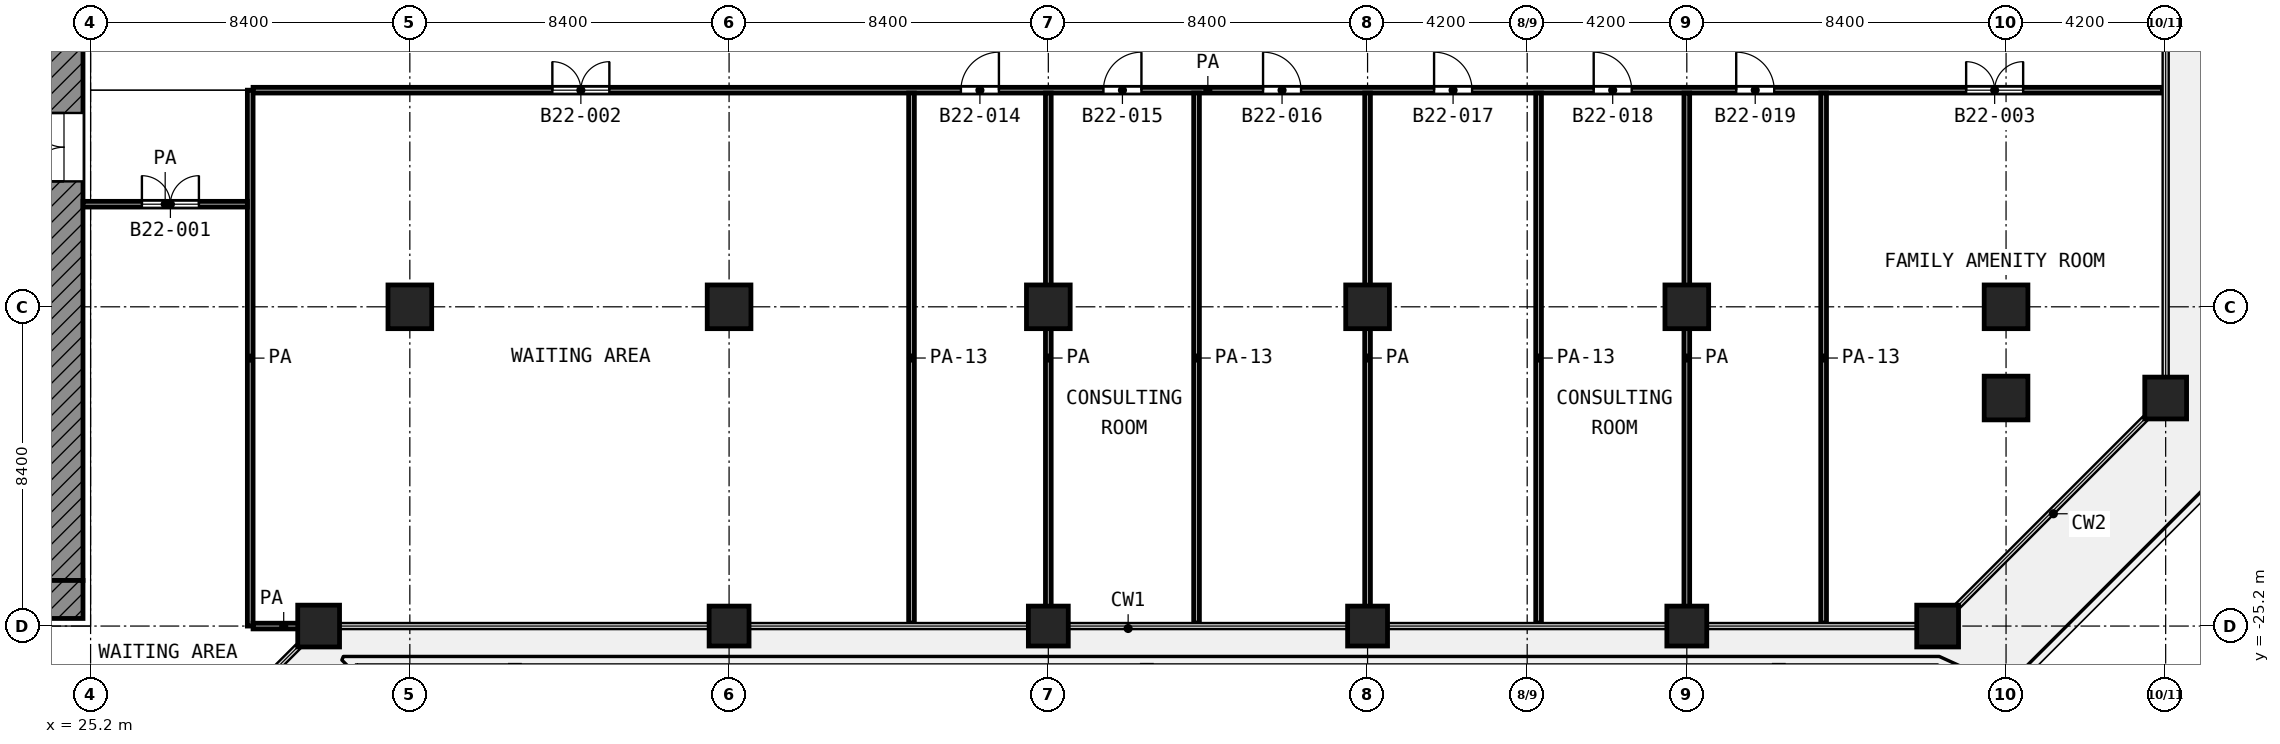
"""IFC4 building model, lengths in metres.
Left out: names, types, materials, properties, quantities, classifications, styles, units other than length and angle.
Written with IfcOpenShell. Run it as: python <this file> out.ifc"""

import sys

from ifc_helpers import new_model, si_unit, direction, frame, frame_2d, origin, origin_2d, place, context, subcontext, project, spatial, rectangle, extrude, element, fill, save


model = new_model("IFC4")
c1 = context("Model", 3, precision=1e-05, world=origin(), true_north=direction((0.0, 1.0)))
c2 = subcontext(c1, "Body", "Model", "MODEL_VIEW")
j1 = project(units=[si_unit("LENGTHUNIT", "METRE"), si_unit("PLANEANGLEUNIT", "RADIAN")], contexts=[c1])
p1 = place(None, origin())
s1 = spatial("IfcSite", under=j1, at=p1, CompositionType="ELEMENT")
p2 = place(p1, origin())
s2 = spatial("IfcBuilding", under=s1, at=p2, CompositionType="ELEMENT")
p3 = place(p2, frame((0.0, 0.0, 98.8)))
s3 = spatial("IfcBuildingStorey", under=s2, at=p3, CompositionType="ELEMENT", Elevation=98.8)
for number, where, z_axis, x_axis in (
    (1, (33.6, -16.8, 0.0), (0.0, 0.0, 1.0), (1.0, 0.0, 0.0)),
    (2, (42.0, -16.8, 0.0), (0.0, 0.0, 1.0), (1.0, 0.0, 0.0)),
    (3, (50.4, -16.8, 0.0), (0.0, 0.0, 1.0), (1.0, 0.0, 0.0)),
    (4, (58.8, -16.8, 0.0), (0.0, 0.0, 1.0), (1.0, 0.0, 0.0)),
    (5, (67.2, -16.8, 0.0), (0.0, 0.0, 1.0), (1.0, 0.0, 0.0)),
    (6, (75.6, -16.8, 0.0), (0.0, 0.0, 1.0), (1.0, 0.0, 0.0)),
    (7, (75.6, -19.2, 0.0), (0.0, 0.0, 1.0), (1.0, 0.0, 0.0)),
):
    element("IfcColumn", number, at=place(p3, frame(where, z_axis=z_axis, x_axis=x_axis)), inside=s3, PredefinedType="COLUMN", context=c2, shape_type="SweptSolid", body=[
        extrude(rectangle(XDim=1.15, YDim=1.15, at=origin_2d()), origin(), (0.0, 0.0, 1.0), 4.2),
    ])
for number, where, z_axis, x_axis in (
    (8, (79.8, -19.2, 0.0), (0.0, 0.0, 1.0), (1.0, 0.0, 0.0)),
    (9, (31.2, -25.2, 0.0), (0.0, 0.0, 1.0), (1.0, 0.0, 0.0)),
):
    element("IfcColumn", number, at=place(p3, frame(where, z_axis=z_axis, x_axis=x_axis)), inside=s3, PredefinedType="COLUMN", context=c2, shape_type="SweptSolid", body=[
        extrude(rectangle(XDim=1.1, YDim=1.1, at=origin_2d()), origin(), (0.0, 0.0, 1.0), 4.2),
    ])
for number, where, z_axis, x_axis in (
    (10, (42.0, -25.2, 0.0), (0.0, 0.0, 1.0), (1.0, 0.0, 0.0)),
    (11, (50.4, -25.2, 0.0), (0.0, 0.0, 1.0), (1.0, 0.0, 0.0)),
    (12, (58.8, -25.2, 0.0), (0.0, 0.0, 1.0), (1.0, 0.0, 0.0)),
    (13, (67.2, -25.2, 0.0), (0.0, 0.0, 1.0), (1.0, 0.0, 0.0)),
):
    element("IfcColumn", number, at=place(p3, frame(where, z_axis=z_axis, x_axis=x_axis)), inside=s3, PredefinedType="COLUMN", context=c2, shape_type="SweptSolid", body=[
        extrude(rectangle(XDim=1.05, YDim=1.05, at=origin_2d()), origin(), (0.0, 0.0, 1.0), 4.2),
    ])
p4 = place(p3, frame((73.8, -25.2, 0.0), z_axis=(0.0, 0.0, 1.0), x_axis=(1.0, 0.0, 0.0)))
e14 = element("IfcColumn", 14, at=p4, inside=s3, PredefinedType="COLUMN", context=c2, shape_type="SweptSolid", body=[
    extrude(rectangle(XDim=1.1, YDim=1.1, at=origin_2d()), origin(), (0.0, 0.0, 1.0), 4.2),
])
p5 = place(p3, frame((24.5, -24.0, 0.0), z_axis=(0.0, 0.0, 1.0), x_axis=(0.0, 1.0, 0.0)))
e15 = element("IfcWall", 15, at=p5, inside=s3, PredefinedType="SHEAR", context=c2, shape_type="SweptSolid", body=[
    extrude(rectangle(XDim=18.6, YDim=1.0, at=frame_2d((9.3, 0.0))), origin(), (0.0, 0.0, 1.0), 3.6),
])
p6 = place(p5, frame((10.5, 0.0, 0.0)))
e16 = element("IfcOpeningElement", 16, at=p6, cuts=e15, PredefinedType="OPENING", context=c2, shape_type="SweptSolid", body=[
    extrude(rectangle(XDim=1.8, YDim=2.1, at=frame_2d((0.9, 1.05))), frame((0.0, 0.51, 0.0), z_axis=(0.0, -1.0, 0.0), x_axis=(1.0, 0.0, 0.0)), (0.0, 0.0, 1.0), 1.02),
])
p7 = place(p3, frame((24.5, -25.0, 0.0), z_axis=(0.0, 0.0, 1.0), x_axis=(0.0, 1.0, 0.0)))
e17 = element("IfcWall", 17, at=p7, inside=s3, PredefinedType="SHEAR", context=c2, shape_type="SweptSolid", body=[
    extrude(rectangle(XDim=1.0, YDim=1.0, at=frame_2d((0.5, 0.0))), origin(), (0.0, 0.0, 1.0), 3.6),
])
p8 = place(p3, frame((29.475, -25.2, 0.0), z_axis=(0.0, 0.0, 1.0), x_axis=(1.0, 0.0, 0.0)))
e18 = element("IfcWall", 18, at=p8, inside=s3, PredefinedType="PARTITIONING", context=c2, shape_type="SweptSolid", body=[
    extrude(rectangle(XDim=1.612, YDim=0.15, at=frame_2d((0.806, 0.0))), origin(), (0.0, 0.0, 1.0), 3.6),
])
p9 = place(p3, frame((25.0, -14.1, 0.0), z_axis=(0.0, 0.0, 1.0), x_axis=(1.0, 0.0, 0.0)))
e19 = element("IfcWall", 19, at=p9, inside=s3, PredefinedType="PARTITIONING", context=c2, shape_type="SweptSolid", body=[
    extrude(rectangle(XDim=4.325, YDim=0.15, at=frame_2d((2.163, 0.0))), origin(), (0.0, 0.0, 1.0), 3.6),
])
p10 = place(p9, frame((1.55, 0.0, 0.0)))
e20 = element("IfcOpeningElement", 20, at=p10, cuts=e19, PredefinedType="OPENING", context=c2, shape_type="SweptSolid", body=[
    extrude(rectangle(XDim=1.5, YDim=2.1, at=frame_2d((0.75, 1.05))), frame((0.0, 0.085, 0.0), z_axis=(0.0, -1.0, 0.0), x_axis=(1.0, 0.0, 0.0)), (0.0, 0.0, 1.0), 0.17),
])
p11 = place(p3, frame((29.475, -11.1, 0.0), z_axis=(0.0, 0.0, 1.0), x_axis=(1.0, 0.0, 0.0)))
e21 = element("IfcWall", 21, at=p11, inside=s3, PredefinedType="PARTITIONING", context=c2, shape_type="SweptSolid", body=[
    extrude(rectangle(XDim=50.245, YDim=0.15, at=frame_2d((25.123, 0.0))), origin(), (0.0, 0.0, 1.0), 3.6),
])
p12 = place(p11, frame((7.875, 0.0, 0.0)))
e22 = element("IfcOpeningElement", 22, at=p12, cuts=e21, PredefinedType="OPENING", context=c2, shape_type="SweptSolid", body=[
    extrude(rectangle(XDim=1.5, YDim=2.1, at=frame_2d((0.75, 1.05))), frame((0.0, 0.085, 0.0), z_axis=(0.0, -1.0, 0.0), x_axis=(1.0, 0.0, 0.0)), (0.0, 0.0, 1.0), 0.17),
])
p13 = place(p11, frame((18.625, 0.0, 0.0)))
e23 = element("IfcOpeningElement", 23, at=p13, cuts=e21, PredefinedType="OPENING", context=c2, shape_type="SweptSolid", body=[
    extrude(rectangle(XDim=1.0, YDim=2.1, at=frame_2d((0.5, 1.05))), frame((0.0, 0.085, 0.0), z_axis=(0.0, -1.0, 0.0), x_axis=(1.0, 0.0, 0.0)), (0.0, 0.0, 1.0), 0.17),
])
p14 = place(p11, frame((22.375, 0.0, 0.0)))
e24 = element("IfcOpeningElement", 24, at=p14, cuts=e21, PredefinedType="OPENING", context=c2, shape_type="SweptSolid", body=[
    extrude(rectangle(XDim=1.0, YDim=2.1, at=frame_2d((0.5, 1.05))), frame((0.0, 0.085, 0.0), z_axis=(0.0, -1.0, 0.0), x_axis=(1.0, 0.0, 0.0)), (0.0, 0.0, 1.0), 0.17),
])
p15 = place(p11, frame((26.575, 0.0, 0.0)))
e25 = element("IfcOpeningElement", 25, at=p15, cuts=e21, PredefinedType="OPENING", context=c2, shape_type="SweptSolid", body=[
    extrude(rectangle(XDim=1.0, YDim=2.1, at=frame_2d((0.5, 1.05))), frame((0.0, 0.085, 0.0), z_axis=(0.0, -1.0, 0.0), x_axis=(1.0, 0.0, 0.0)), (0.0, 0.0, 1.0), 0.17),
])
p16 = place(p11, frame((31.075, 0.0, 0.0)))
e26 = element("IfcOpeningElement", 26, at=p16, cuts=e21, PredefinedType="OPENING", context=c2, shape_type="SweptSolid", body=[
    extrude(rectangle(XDim=1.0, YDim=2.1, at=frame_2d((0.5, 1.05))), frame((0.0, 0.085, 0.0), z_axis=(0.0, -1.0, 0.0), x_axis=(1.0, 0.0, 0.0)), (0.0, 0.0, 1.0), 0.17),
])
p17 = place(p11, frame((35.275, 0.0, 0.0)))
e27 = element("IfcOpeningElement", 27, at=p17, cuts=e21, PredefinedType="OPENING", context=c2, shape_type="SweptSolid", body=[
    extrude(rectangle(XDim=1.0, YDim=2.1, at=frame_2d((0.5, 1.05))), frame((0.0, 0.085, 0.0), z_axis=(0.0, -1.0, 0.0), x_axis=(1.0, 0.0, 0.0)), (0.0, 0.0, 1.0), 0.17),
])
p18 = place(p11, frame((39.025, 0.0, 0.0)))
e28 = element("IfcOpeningElement", 28, at=p18, cuts=e21, PredefinedType="OPENING", context=c2, shape_type="SweptSolid", body=[
    extrude(rectangle(XDim=1.0, YDim=2.1, at=frame_2d((0.5, 1.05))), frame((0.0, 0.085, 0.0), z_axis=(0.0, -1.0, 0.0), x_axis=(1.0, 0.0, 0.0)), (0.0, 0.0, 1.0), 0.17),
])
p19 = place(p11, frame((45.075, 0.0, 0.0)))
e29 = element("IfcOpeningElement", 29, at=p19, cuts=e21, PredefinedType="OPENING", context=c2, shape_type="SweptSolid", body=[
    extrude(rectangle(XDim=1.5, YDim=2.1, at=frame_2d((0.75, 1.05))), frame((0.0, 0.085, 0.0), z_axis=(0.0, -1.0, 0.0), x_axis=(1.0, 0.0, 0.0)), (0.0, 0.0, 1.0), 0.17),
])
p20 = place(p3, frame((29.4, -25.2, 0.0), z_axis=(0.0, 0.0, 1.0), x_axis=(0.0, 1.0, 0.0)))
e30 = element("IfcWall", 30, at=p20, inside=s3, PredefinedType="PARTITIONING", context=c2, shape_type="SweptSolid", body=[
    extrude(rectangle(XDim=14.1, YDim=0.15, at=frame_2d((7.05, 0.0))), origin(), (0.0, 0.0, 1.0), 3.6),
])
p21 = place(p3, frame((46.8, -25.12, 0.0), z_axis=(0.0, 0.0, 1.0), x_axis=(0.0, 1.0, 0.0)))
e31 = element("IfcWall", 31, at=p21, inside=s3, PredefinedType="PARTITIONING", context=c2, shape_type="SweptSolid", body=[
    extrude(rectangle(XDim=13.945, YDim=0.15, at=frame_2d((6.973, 0.0))), origin(), (0.0, 0.0, 1.0), 2.7),
])
p22 = place(p3, frame((50.4, -25.12, 0.0), z_axis=(0.0, 0.0, 1.0), x_axis=(0.0, 1.0, 0.0)))
e32 = element("IfcWall", 32, at=p22, inside=s3, PredefinedType="PARTITIONING", context=c2, shape_type="SweptSolid", body=[
    extrude(rectangle(XDim=13.945, YDim=0.15, at=frame_2d((6.973, 0.0))), origin(), (0.0, 0.0, 1.0), 3.6),
])
p23 = place(p3, frame((54.3, -25.12, 0.0), z_axis=(0.0, 0.0, 1.0), x_axis=(0.0, 1.0, 0.0)))
e33 = element("IfcWall", 33, at=p23, inside=s3, PredefinedType="PARTITIONING", context=c2, shape_type="SweptSolid", body=[
    extrude(rectangle(XDim=13.945, YDim=0.15, at=frame_2d((6.973, 0.0))), origin(), (0.0, 0.0, 1.0), 2.7),
])
p24 = place(p3, frame((58.8, -25.12, 0.0), z_axis=(0.0, 0.0, 1.0), x_axis=(0.0, 1.0, 0.0)))
e34 = element("IfcWall", 34, at=p24, inside=s3, PredefinedType="PARTITIONING", context=c2, shape_type="SweptSolid", body=[
    extrude(rectangle(XDim=13.945, YDim=0.15, at=frame_2d((6.973, 0.0))), origin(), (0.0, 0.0, 1.0), 3.6),
])
p25 = place(p3, frame((63.3, -25.12, 0.0), z_axis=(0.0, 0.0, 1.0), x_axis=(0.0, 1.0, 0.0)))
e35 = element("IfcWall", 35, at=p25, inside=s3, PredefinedType="PARTITIONING", context=c2, shape_type="SweptSolid", body=[
    extrude(rectangle(XDim=13.945, YDim=0.15, at=frame_2d((6.973, 0.0))), origin(), (0.0, 0.0, 1.0), 2.7),
])
p26 = place(p3, frame((67.2, -25.12, 0.0), z_axis=(0.0, 0.0, 1.0), x_axis=(0.0, 1.0, 0.0)))
e36 = element("IfcWall", 36, at=p26, inside=s3, PredefinedType="PARTITIONING", context=c2, shape_type="SweptSolid", body=[
    extrude(rectangle(XDim=13.945, YDim=0.15, at=frame_2d((6.973, 0.0))), origin(), (0.0, 0.0, 1.0), 3.6),
])
p27 = place(p3, frame((70.8, -25.12, 0.0), z_axis=(0.0, 0.0, 1.0), x_axis=(0.0, 1.0, 0.0)))
e37 = element("IfcWall", 37, at=p27, inside=s3, PredefinedType="PARTITIONING", context=c2, shape_type="SweptSolid", body=[
    extrude(rectangle(XDim=13.945, YDim=0.15, at=frame_2d((6.973, 0.0))), origin(), (0.0, 0.0, 1.0), 2.7),
])
p28 = place(p6, origin())
e38 = element("IfcDoor", 38, at=p28, inside=s3, OperationType="DOUBLE_DOOR_SINGLE_SWING", PredefinedType="DOOR", context=c2, shape_type="SweptSolid", body=[
    extrude(rectangle(XDim=1.8, YDim=2.1, at=frame_2d((0.9, 1.05))), frame((0.0, 0.025, 0.0), z_axis=(0.0, -1.0, 0.0), x_axis=(1.0, 0.0, 0.0)), (0.0, 0.0, 1.0), 0.05),
])
fill(e16, e38)
p29 = place(p10, origin())
e39 = element("IfcDoor", 39, at=p29, inside=s3, OperationType="DOUBLE_DOOR_SINGLE_SWING", PredefinedType="DOOR", context=c2, shape_type="SweptSolid", body=[
    extrude(rectangle(XDim=1.5, YDim=2.1, at=frame_2d((0.75, 1.05))), frame((0.0, 0.025, 0.0), z_axis=(0.0, -1.0, 0.0), x_axis=(1.0, 0.0, 0.0)), (0.0, 0.0, 1.0), 0.05),
])
fill(e20, e39)
p30 = place(p12, origin())
e40 = element("IfcDoor", 40, at=p30, inside=s3, OperationType="DOUBLE_DOOR_SINGLE_SWING", PredefinedType="DOOR", context=c2, shape_type="SweptSolid", body=[
    extrude(rectangle(XDim=1.5, YDim=2.1, at=frame_2d((0.75, 1.05))), frame((0.0, 0.025, 0.0), z_axis=(0.0, -1.0, 0.0), x_axis=(1.0, 0.0, 0.0)), (0.0, 0.0, 1.0), 0.05),
])
fill(e22, e40)
p31 = place(p13, origin())
e41 = element("IfcDoor", 41, at=p31, inside=s3, OperationType="SINGLE_SWING_RIGHT", PredefinedType="DOOR", context=c2, shape_type="SweptSolid", body=[
    extrude(rectangle(XDim=1.0, YDim=2.1, at=frame_2d((0.5, 1.05))), frame((0.0, 0.025, 0.0), z_axis=(0.0, -1.0, 0.0), x_axis=(1.0, 0.0, 0.0)), (0.0, 0.0, 1.0), 0.05),
])
fill(e23, e41)
p32 = place(p14, origin())
e42 = element("IfcDoor", 42, at=p32, inside=s3, OperationType="SINGLE_SWING_RIGHT", PredefinedType="DOOR", context=c2, shape_type="SweptSolid", body=[
    extrude(rectangle(XDim=1.0, YDim=2.1, at=frame_2d((0.5, 1.05))), frame((0.0, 0.025, 0.0), z_axis=(0.0, -1.0, 0.0), x_axis=(1.0, 0.0, 0.0)), (0.0, 0.0, 1.0), 0.05),
])
fill(e24, e42)
p33 = place(p15, origin())
e43 = element("IfcDoor", 43, at=p33, inside=s3, OperationType="SINGLE_SWING_LEFT", PredefinedType="DOOR", context=c2, shape_type="SweptSolid", body=[
    extrude(rectangle(XDim=1.0, YDim=2.1, at=frame_2d((0.5, 1.05))), frame((0.0, 0.025, 0.0), z_axis=(0.0, -1.0, 0.0), x_axis=(1.0, 0.0, 0.0)), (0.0, 0.0, 1.0), 0.05),
])
fill(e25, e43)
p34 = place(p16, origin())
e44 = element("IfcDoor", 44, at=p34, inside=s3, OperationType="SINGLE_SWING_LEFT", PredefinedType="DOOR", context=c2, shape_type="SweptSolid", body=[
    extrude(rectangle(XDim=1.0, YDim=2.1, at=frame_2d((0.5, 1.05))), frame((0.0, 0.025, 0.0), z_axis=(0.0, -1.0, 0.0), x_axis=(1.0, 0.0, 0.0)), (0.0, 0.0, 1.0), 0.05),
])
fill(e26, e44)
p35 = place(p17, origin())
e45 = element("IfcDoor", 45, at=p35, inside=s3, OperationType="SINGLE_SWING_LEFT", PredefinedType="DOOR", context=c2, shape_type="SweptSolid", body=[
    extrude(rectangle(XDim=1.0, YDim=2.1, at=frame_2d((0.5, 1.05))), frame((0.0, 0.025, 0.0), z_axis=(0.0, -1.0, 0.0), x_axis=(1.0, 0.0, 0.0)), (0.0, 0.0, 1.0), 0.05),
])
fill(e27, e45)
p36 = place(p18, origin())
e46 = element("IfcDoor", 46, at=p36, inside=s3, OperationType="SINGLE_SWING_LEFT", PredefinedType="DOOR", context=c2, shape_type="SweptSolid", body=[
    extrude(rectangle(XDim=1.0, YDim=2.1, at=frame_2d((0.5, 1.05))), frame((0.0, 0.025, 0.0), z_axis=(0.0, -1.0, 0.0), x_axis=(1.0, 0.0, 0.0)), (0.0, 0.0, 1.0), 0.05),
])
fill(e28, e46)
p37 = place(p19, origin())
e47 = element("IfcDoor", 47, at=p37, inside=s3, OperationType="DOUBLE_DOOR_SINGLE_SWING", PredefinedType="DOOR", context=c2, shape_type="SweptSolid", body=[
    extrude(rectangle(XDim=1.5, YDim=2.1, at=frame_2d((0.75, 1.05))), frame((0.0, 0.025, 0.0), z_axis=(0.0, -1.0, 0.0), x_axis=(1.0, 0.0, 0.0)), (0.0, 0.0, 1.0), 0.05),
])
fill(e29, e47)
save(model, sys.argv[1])
